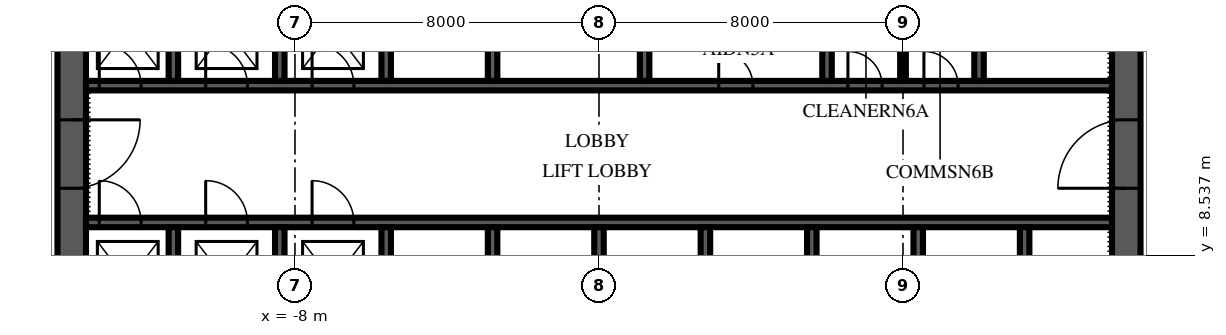
"""IFC4 building model, lengths in metres.
Left out: names, types, materials, properties, quantities, classifications, styles, units other than length and angle.
Written with IfcOpenShell. Run it as: python <this file> out.ifc"""

import sys

from ifc_helpers import new_model, si_unit, direction, frame, frame_2d, origin, place, context, subcontext, project, spatial, polyline, rectangle, outline, extrude, element, fill, save


model = new_model("IFC4")
c1 = context("Model", 3, precision=1e-05, world=origin(), true_north=direction((0.0, 1.0)))
c2 = subcontext(c1, "Body", "Model", "MODEL_VIEW")
j1 = project(units=[si_unit("LENGTHUNIT", "METRE"), si_unit("PLANEANGLEUNIT", "RADIAN")], contexts=[c1])
p1 = place(None, origin())
s1 = spatial("IfcSite", under=j1, at=p1, CompositionType="ELEMENT")
p2 = place(p1, origin())
s2 = spatial("IfcBuilding", under=s1, at=p2, CompositionType="ELEMENT")
p3 = place(p2, frame((0.0, 0.0, 139.0)))
s3 = spatial("IfcBuildingStorey", under=s2, at=p3, CompositionType="ELEMENT", Elevation=139.0)
p4 = place(p3, frame((13.875, 6.125, 0.0), z_axis=(0.0, 0.0, 1.0), x_axis=(0.0, 1.0, 0.0)))
e1 = element("IfcWall", 1, at=p4, inside=s3, PredefinedType="SHEAR", context=c2, shape_type="SweptSolid", body=[
    extrude(outline(polyline([(0.0, -0.375), (17.75, -0.375), (17.75, 0.0), (17.375, 0.0), (17.375, 0.375), (0.375, 0.375), (0.375, 0.0), (0.0, 0.0), (0.0, -0.375)])), origin(), (0.0, 0.0, 1.0), 4.0),
])
p5 = place(p4, frame((4.175, 0.0, 0.0)))
e2 = element("IfcOpeningElement", 2, at=p5, cuts=e1, PredefinedType="OPENING", context=c2, shape_type="SweptSolid", body=[
    extrude(rectangle(XDim=1.8, YDim=2.4, at=frame_2d((0.9, 1.2))), frame((0.0, 0.39, 0.0), z_axis=(0.0, -1.0, 0.0), x_axis=(1.0, 0.0, 0.0)), (0.0, 0.0, 1.0), 0.78),
])
p6 = place(p3, frame((-13.875, 23.875, 0.0), z_axis=(0.0, 0.0, 1.0), x_axis=(0.0, -1.0, 0.0)))
e3 = element("IfcWall", 3, at=p6, inside=s3, PredefinedType="SHEAR", context=c2, shape_type="SweptSolid", body=[
    extrude(outline(polyline([(0.0, -0.375), (17.75, -0.375), (17.75, 0.0), (17.375, 0.0), (17.375, 0.375), (0.375, 0.375), (0.375, 0.0), (0.0, 0.0), (0.0, -0.375)])), origin(), (0.0, 0.0, 1.0), 4.0),
])
p7 = place(p6, frame((11.775, 0.0, 0.0)))
e4 = element("IfcOpeningElement", 4, at=p7, cuts=e3, PredefinedType="OPENING", context=c2, shape_type="SweptSolid", body=[
    extrude(rectangle(XDim=1.8, YDim=2.4, at=frame_2d((0.9, 1.2))), frame((0.0, 0.39, 0.0), z_axis=(0.0, -1.0, 0.0), x_axis=(1.0, 0.0, 0.0)), (0.0, 0.0, 1.0), 0.78),
])
p8 = place(p3, frame((-13.5, 9.4, 0.0), z_axis=(0.0, 0.0, 1.0), x_axis=(1.0, 0.0, 0.0)))
e5 = element("IfcWall", 5, at=p8, inside=s3, PredefinedType="SHEAR", context=c2, shape_type="SweptSolid", body=[
    extrude(rectangle(XDim=27.0, YDim=0.25, at=frame_2d((13.5, 0.0))), origin(), (0.0, 0.0, 1.0), 4.0),
])
p9 = place(p8, frame((0.35, 0.0, 0.0)))
e6 = element("IfcOpeningElement", 6, at=p9, cuts=e5, PredefinedType="OPENING", context=c2, shape_type="SweptSolid", body=[
    extrude(rectangle(XDim=1.1, YDim=2.1, at=frame_2d((0.55, 1.05))), frame((0.0, 0.14, 0.0), z_axis=(0.0, -1.0, 0.0), x_axis=(1.0, 0.0, 0.0)), (0.0, 0.0, 1.0), 0.28),
])
p10 = place(p8, frame((3.15, 0.0, 0.0)))
e7 = element("IfcOpeningElement", 7, at=p10, cuts=e5, PredefinedType="OPENING", context=c2, shape_type="SweptSolid", body=[
    extrude(rectangle(XDim=1.1, YDim=2.1, at=frame_2d((0.55, 1.05))), frame((0.0, 0.14, 0.0), z_axis=(0.0, -1.0, 0.0), x_axis=(1.0, 0.0, 0.0)), (0.0, 0.0, 1.0), 0.28),
])
p11 = place(p8, frame((5.95, 0.0, 0.0)))
e8 = element("IfcOpeningElement", 8, at=p11, cuts=e5, PredefinedType="OPENING", context=c2, shape_type="SweptSolid", body=[
    extrude(rectangle(XDim=1.1, YDim=2.1, at=frame_2d((0.55, 1.05))), frame((0.0, 0.14, 0.0), z_axis=(0.0, -1.0, 0.0), x_axis=(1.0, 0.0, 0.0)), (0.0, 0.0, 1.0), 0.28),
])
p12 = place(p3, frame((-13.5, 13.0, 0.0), z_axis=(0.0, 0.0, 1.0), x_axis=(1.0, 0.0, 0.0)))
e9 = element("IfcWall", 9, at=p12, inside=s3, PredefinedType="SHEAR", context=c2, shape_type="SweptSolid", body=[
    extrude(rectangle(XDim=27.0, YDim=0.25, at=frame_2d((13.5, 0.0))), origin(), (0.0, 0.0, 1.0), 4.0),
])
p13 = place(p12, frame((0.35, 0.0, 0.0)))
e10 = element("IfcOpeningElement", 10, at=p13, cuts=e9, PredefinedType="OPENING", context=c2, shape_type="SweptSolid", body=[
    extrude(rectangle(XDim=1.1, YDim=2.1, at=frame_2d((0.55, 1.05))), frame((0.0, 0.14, 0.0), z_axis=(0.0, -1.0, 0.0), x_axis=(1.0, 0.0, 0.0)), (0.0, 0.0, 1.0), 0.28),
])
p14 = place(p12, frame((3.15, 0.0, 0.0)))
e11 = element("IfcOpeningElement", 11, at=p14, cuts=e9, PredefinedType="OPENING", context=c2, shape_type="SweptSolid", body=[
    extrude(rectangle(XDim=1.1, YDim=2.1, at=frame_2d((0.55, 1.05))), frame((0.0, 0.14, 0.0), z_axis=(0.0, -1.0, 0.0), x_axis=(1.0, 0.0, 0.0)), (0.0, 0.0, 1.0), 0.28),
])
p15 = place(p12, frame((5.95, 0.0, 0.0)))
e12 = element("IfcOpeningElement", 12, at=p15, cuts=e9, PredefinedType="OPENING", context=c2, shape_type="SweptSolid", body=[
    extrude(rectangle(XDim=1.1, YDim=2.1, at=frame_2d((0.55, 1.05))), frame((0.0, 0.14, 0.0), z_axis=(0.0, -1.0, 0.0), x_axis=(1.0, 0.0, 0.0)), (0.0, 0.0, 1.0), 0.28),
])
p16 = place(p12, frame((16.65, 0.0, 0.0)))
e13 = element("IfcOpeningElement", 13, at=p16, cuts=e9, PredefinedType="OPENING", context=c2, shape_type="SweptSolid", body=[
    extrude(rectangle(XDim=0.9, YDim=2.1, at=frame_2d((0.45, 1.05))), frame((0.0, 0.14, 0.0), z_axis=(0.0, -1.0, 0.0), x_axis=(1.0, 0.0, 0.0)), (0.0, 0.0, 1.0), 0.28),
])
p17 = place(p12, frame((20.05, 0.0, 0.0)))
e14 = element("IfcOpeningElement", 14, at=p17, cuts=e9, PredefinedType="OPENING", context=c2, shape_type="SweptSolid", body=[
    extrude(rectangle(XDim=0.9, YDim=2.1, at=frame_2d((0.45, 1.05))), frame((0.0, 0.14, 0.0), z_axis=(0.0, -1.0, 0.0), x_axis=(1.0, 0.0, 0.0)), (0.0, 0.0, 1.0), 0.28),
])
p18 = place(p12, frame((22.05, 0.0, 0.0)))
e15 = element("IfcOpeningElement", 15, at=p18, cuts=e9, PredefinedType="OPENING", context=c2, shape_type="SweptSolid", body=[
    extrude(rectangle(XDim=0.9, YDim=2.1, at=frame_2d((0.45, 1.05))), frame((0.0, 0.14, 0.0), z_axis=(0.0, -1.0, 0.0), x_axis=(1.0, 0.0, 0.0)), (0.0, 0.0, 1.0), 0.28),
])
for number, where, z_axis, x_axis in (
    (16, (-11.2, 6.5, 0.0), (0.0, 0.0, 1.0), (0.0, 1.0, 0.0)),
    (17, (-8.4, 6.5, 0.0), (0.0, 0.0, 1.0), (0.0, 1.0, 0.0)),
    (18, (-5.6, 6.5, 0.0), (0.0, 0.0, 1.0), (0.0, 1.0, 0.0)),
    (19, (-2.8, 6.5, 0.0), (0.0, 0.0, 1.0), (0.0, 1.0, 0.0)),
    (20, (0.0, 6.5, 0.0), (0.0, 0.0, 1.0), (0.0, 1.0, 0.0)),
    (21, (2.8, 6.5, 0.0), (0.0, 0.0, 1.0), (0.0, 1.0, 0.0)),
    (22, (5.6, 6.5, 0.0), (0.0, 0.0, 1.0), (0.0, 1.0, 0.0)),
    (23, (8.4, 6.5, 0.0), (0.0, 0.0, 1.0), (0.0, 1.0, 0.0)),
    (24, (11.2, 6.5, 0.0), (0.0, 0.0, 1.0), (0.0, 1.0, 0.0)),
):
    element("IfcWall", number, at=place(p3, frame(where, z_axis=z_axis, x_axis=x_axis)), inside=s3, PredefinedType="SHEAR", context=c2, shape_type="SweptSolid", body=[
        extrude(rectangle(XDim=2.775, YDim=0.25, at=frame_2d((1.387, 0.0))), origin(), (0.0, 0.0, 1.0), 4.0),
    ])
for number, where, z_axis, x_axis in (
    (25, (-11.2, 13.125, 0.0), (0.0, 0.0, 1.0), (0.0, 1.0, 0.0)),
    (26, (-8.4, 13.125, 0.0), (0.0, 0.0, 1.0), (0.0, 1.0, 0.0)),
    (27, (-5.6, 13.125, 0.0), (0.0, 0.0, 1.0), (0.0, 1.0, 0.0)),
    (28, (-2.8, 13.125, 0.0), (0.0, 0.0, 1.0), (0.0, 1.0, 0.0)),
    (29, (1.2, 13.125, 0.0), (0.0, 0.0, 1.0), (0.0, 1.0, 0.0)),
    (30, (6.0, 13.125, 0.0), (0.0, 0.0, 1.0), (0.0, 1.0, 0.0)),
    (31, (10.0, 13.125, 0.0), (0.0, 0.0, 1.0), (0.0, 1.0, 0.0)),
):
    element("IfcWall", number, at=place(p3, frame(where, z_axis=z_axis, x_axis=x_axis)), inside=s3, PredefinedType="SHEAR", context=c2, shape_type="SweptSolid", body=[
        extrude(rectangle(XDim=2.75, YDim=0.25, at=frame_2d((1.375, 0.0))), origin(), (0.0, 0.0, 1.0), 4.0),
    ])
p19 = place(p3, frame((8.0, 13.125, 0.0), z_axis=(0.0, 0.0, 1.0), x_axis=(0.0, 1.0, 0.0)))
e32 = element("IfcWall", 32, at=p19, inside=s3, PredefinedType="PARTITIONING", context=c2, shape_type="SweptSolid", body=[
    extrude(rectangle(XDim=2.75, YDim=0.15, at=frame_2d((1.375, 0.0))), origin(), (0.0, 0.0, 1.0), 3.85),
])
p20 = place(p5, origin())
e33 = element("IfcDoor", 33, at=p20, inside=s3, OperationType="DOUBLE_DOOR_SINGLE_SWING", PredefinedType="DOOR", context=c2, shape_type="SweptSolid", body=[
    extrude(rectangle(XDim=1.8, YDim=2.4, at=frame_2d((0.9, 1.2))), frame((0.0, 0.375, 0.0), z_axis=(0.0, -1.0, 0.0), x_axis=(1.0, 0.0, 0.0)), (0.0, 0.0, 1.0), 0.75),
])
fill(e2, e33)
p21 = place(p7, origin())
e34 = element("IfcDoor", 34, at=p21, inside=s3, OperationType="DOUBLE_DOOR_SINGLE_SWING", PredefinedType="DOOR", context=c2, shape_type="SweptSolid", body=[
    extrude(rectangle(XDim=1.8, YDim=2.4, at=frame_2d((0.9, 1.2))), frame((0.0, 0.375, 0.0), z_axis=(0.0, -1.0, 0.0), x_axis=(1.0, 0.0, 0.0)), (0.0, 0.0, 1.0), 0.75),
])
fill(e4, e34)
p22 = place(p9, origin())
e35 = element("IfcDoor", 35, at=p22, inside=s3, OperationType="SLIDING_TO_LEFT", PredefinedType="DOOR", context=c2, shape_type="SweptSolid", body=[
    extrude(rectangle(XDim=1.1, YDim=2.1, at=frame_2d((0.55, 1.05))), frame((0.0, 0.125, 0.0), z_axis=(0.0, -1.0, 0.0), x_axis=(1.0, 0.0, 0.0)), (0.0, 0.0, 1.0), 0.25),
])
fill(e6, e35)
p23 = place(p10, origin())
e36 = element("IfcDoor", 36, at=p23, inside=s3, OperationType="SLIDING_TO_LEFT", PredefinedType="DOOR", context=c2, shape_type="SweptSolid", body=[
    extrude(rectangle(XDim=1.1, YDim=2.1, at=frame_2d((0.55, 1.05))), frame((0.0, 0.125, 0.0), z_axis=(0.0, -1.0, 0.0), x_axis=(1.0, 0.0, 0.0)), (0.0, 0.0, 1.0), 0.25),
])
fill(e7, e36)
p24 = place(p11, origin())
e37 = element("IfcDoor", 37, at=p24, inside=s3, OperationType="SLIDING_TO_LEFT", PredefinedType="DOOR", context=c2, shape_type="SweptSolid", body=[
    extrude(rectangle(XDim=1.1, YDim=2.1, at=frame_2d((0.55, 1.05))), frame((0.0, 0.125, 0.0), z_axis=(0.0, -1.0, 0.0), x_axis=(1.0, 0.0, 0.0)), (0.0, 0.0, 1.0), 0.25),
])
fill(e8, e37)
p25 = place(p13, origin())
e38 = element("IfcDoor", 38, at=p25, inside=s3, OperationType="SLIDING_TO_LEFT", PredefinedType="DOOR", context=c2, shape_type="SweptSolid", body=[
    extrude(rectangle(XDim=1.1, YDim=2.1, at=frame_2d((0.55, 1.05))), frame((0.0, 0.125, 0.0), z_axis=(0.0, -1.0, 0.0), x_axis=(1.0, 0.0, 0.0)), (0.0, 0.0, 1.0), 0.25),
])
fill(e10, e38)
p26 = place(p14, origin())
e39 = element("IfcDoor", 39, at=p26, inside=s3, OperationType="SLIDING_TO_LEFT", PredefinedType="DOOR", context=c2, shape_type="SweptSolid", body=[
    extrude(rectangle(XDim=1.1, YDim=2.1, at=frame_2d((0.55, 1.05))), frame((0.0, 0.125, 0.0), z_axis=(0.0, -1.0, 0.0), x_axis=(1.0, 0.0, 0.0)), (0.0, 0.0, 1.0), 0.25),
])
fill(e11, e39)
p27 = place(p15, origin())
e40 = element("IfcDoor", 40, at=p27, inside=s3, OperationType="SLIDING_TO_LEFT", PredefinedType="DOOR", context=c2, shape_type="SweptSolid", body=[
    extrude(rectangle(XDim=1.1, YDim=2.1, at=frame_2d((0.55, 1.05))), frame((0.0, 0.125, 0.0), z_axis=(0.0, -1.0, 0.0), x_axis=(1.0, 0.0, 0.0)), (0.0, 0.0, 1.0), 0.25),
])
fill(e12, e40)
p28 = place(p16, origin())
e41 = element("IfcDoor", 41, at=p28, inside=s3, OperationType="SINGLE_SWING_LEFT", PredefinedType="DOOR", context=c2, shape_type="SweptSolid", body=[
    extrude(rectangle(XDim=0.9, YDim=2.1, at=frame_2d((0.45, 1.05))), frame((0.0, 0.125, 0.0), z_axis=(0.0, -1.0, 0.0), x_axis=(1.0, 0.0, 0.0)), (0.0, 0.0, 1.0), 0.25),
])
fill(e13, e41)
p29 = place(p17, origin())
e42 = element("IfcDoor", 42, at=p29, inside=s3, OperationType="SINGLE_SWING_LEFT", PredefinedType="DOOR", context=c2, shape_type="SweptSolid", body=[
    extrude(rectangle(XDim=0.9, YDim=2.1, at=frame_2d((0.45, 1.05))), frame((0.0, 0.125, 0.0), z_axis=(0.0, -1.0, 0.0), x_axis=(1.0, 0.0, 0.0)), (0.0, 0.0, 1.0), 0.25),
])
fill(e14, e42)
p30 = place(p18, origin())
e43 = element("IfcDoor", 43, at=p30, inside=s3, OperationType="SINGLE_SWING_LEFT", PredefinedType="DOOR", context=c2, shape_type="SweptSolid", body=[
    extrude(rectangle(XDim=0.9, YDim=2.1, at=frame_2d((0.45, 1.05))), frame((0.0, 0.125, 0.0), z_axis=(0.0, -1.0, 0.0), x_axis=(1.0, 0.0, 0.0)), (0.0, 0.0, 1.0), 0.25),
])
fill(e15, e43)
save(model, sys.argv[1])
